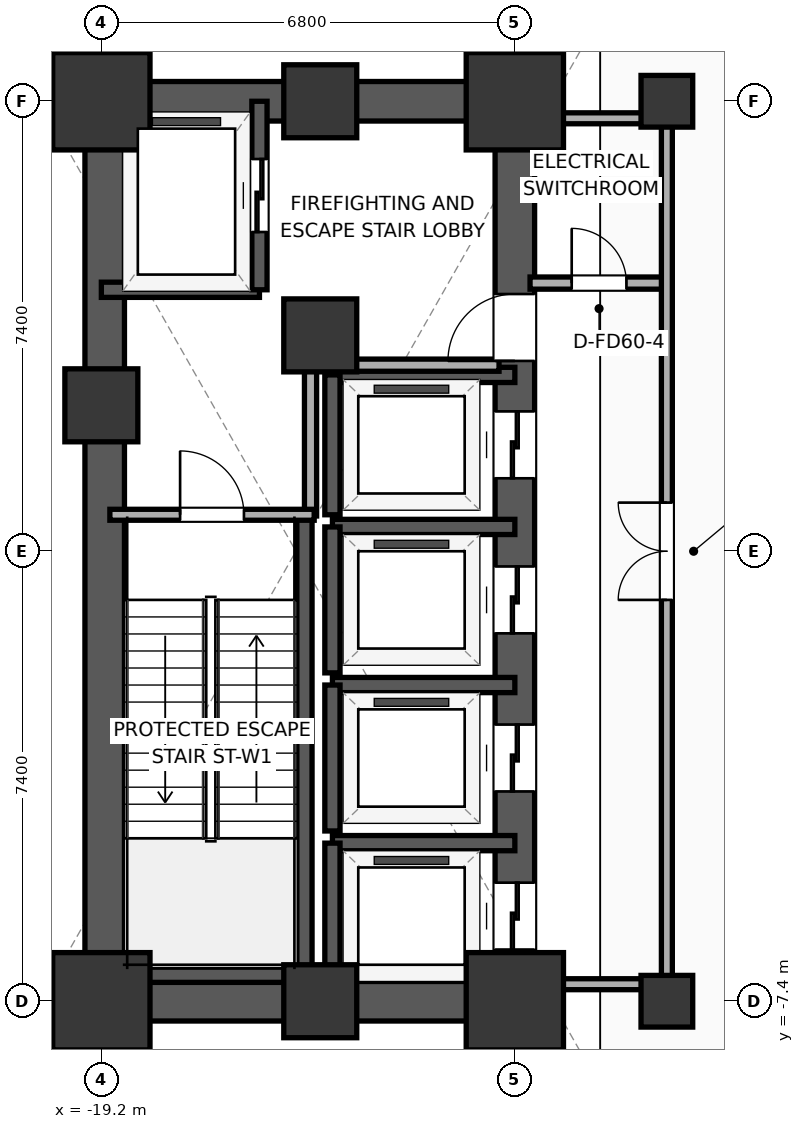
"""IFC4 building model, lengths in metres.
Left out: names, types, materials, properties, quantities, classifications, styles, units other than length and angle.
Written with IfcOpenShell. Run it as: python <this file> out.ifc"""

import sys

from ifc_helpers import new_model, si_unit, direction, frame, frame_2d, origin, origin_2d, place, context, subcontext, project, spatial, rectangle, extrude, element, fill, save


model = new_model("IFC4")
c1 = context("Model", 3, precision=1e-05, world=origin(), true_north=direction((0.0, 1.0)))
c2 = subcontext(c1, "Body", "Model", "MODEL_VIEW")
j1 = project(units=[si_unit("LENGTHUNIT", "METRE"), si_unit("PLANEANGLEUNIT", "RADIAN")], contexts=[c1])
p1 = place(None, origin())
s1 = spatial("IfcSite", under=j1, at=p1, CompositionType="ELEMENT")
p2 = place(p1, origin())
s2 = spatial("IfcBuilding", under=s1, at=p2, CompositionType="ELEMENT")
p3 = place(p2, frame((0.0, 0.0, -10.4)))
s3 = spatial("IfcBuildingStorey", under=s2, at=p3, CompositionType="ELEMENT", Elevation=-10.4)
p4 = place(p3, frame((-19.2, -7.4, 0.0), z_axis=(0.0, 0.0, 1.0), x_axis=(1.0, 0.0, 0.0)))
e1 = element("IfcColumn", 1, at=p4, inside=s3, PredefinedType="COLUMN", context=c2, shape_type="SweptSolid", body=[
    extrude(rectangle(XDim=1.6, YDim=1.6, at=origin_2d()), origin(), (0.0, 0.0, 1.0), 5.2),
])
p5 = place(p3, frame((-19.2, 2.4, 0.0), z_axis=(0.0, 0.0, 1.0), x_axis=(1.0, 0.0, 0.0)))
e2 = element("IfcColumn", 2, at=p5, inside=s3, PredefinedType="COLUMN", context=c2, shape_type="SweptSolid", body=[
    extrude(rectangle(XDim=1.2, YDim=1.2, at=origin_2d()), origin(), (0.0, 0.0, 1.0), 5.2),
])
p6 = place(p3, frame((-19.2, 7.4, 0.0), z_axis=(0.0, 0.0, 1.0), x_axis=(1.0, 0.0, 0.0)))
e3 = element("IfcColumn", 3, at=p6, inside=s3, PredefinedType="COLUMN", context=c2, shape_type="SweptSolid", body=[
    extrude(rectangle(XDim=1.6, YDim=1.6, at=origin_2d()), origin(), (0.0, 0.0, 1.0), 5.2),
])
for number, where, z_axis, x_axis in (
    (4, (-15.6, -7.4, 0.0), (0.0, 0.0, 1.0), (1.0, 0.0, 0.0)),
    (5, (-15.6, 7.4, 0.0), (0.0, 0.0, 1.0), (1.0, 0.0, 0.0)),
):
    element("IfcColumn", number, at=place(p3, frame(where, z_axis=z_axis, x_axis=x_axis)), inside=s3, PredefinedType="COLUMN", context=c2, shape_type="SweptSolid", body=[
        extrude(rectangle(XDim=1.2, YDim=1.2, at=origin_2d()), origin(), (0.0, 0.0, 1.0), 5.2),
    ])
p7 = place(p3, frame((-12.4, -7.4, 0.0), z_axis=(0.0, 0.0, 1.0), x_axis=(1.0, 0.0, 0.0)))
e6 = element("IfcColumn", 6, at=p7, inside=s3, PredefinedType="COLUMN", context=c2, shape_type="SweptSolid", body=[
    extrude(rectangle(XDim=1.6, YDim=1.6, at=origin_2d()), origin(), (0.0, 0.0, 1.0), 5.2),
])
p8 = place(p3, frame((-15.6, 3.55, 0.0), z_axis=(0.0, 0.0, 1.0), x_axis=(1.0, 0.0, 0.0)))
e7 = element("IfcColumn", 7, at=p8, inside=s3, PredefinedType="COLUMN", context=c2, shape_type="SweptSolid", body=[
    extrude(rectangle(XDim=1.2, YDim=1.2, at=origin_2d()), origin(), (0.0, 0.0, 1.0), 5.2),
])
p9 = place(p3, frame((-12.4, 7.4, 0.0), z_axis=(0.0, 0.0, 1.0), x_axis=(1.0, 0.0, 0.0)))
e8 = element("IfcColumn", 8, at=p9, inside=s3, PredefinedType="COLUMN", context=c2, shape_type="SweptSolid", body=[
    extrude(rectangle(XDim=1.6, YDim=1.6, at=origin_2d()), origin(), (0.0, 0.0, 1.0), 5.2),
])
for number, where, z_axis, x_axis in (
    (9, (-19.525, -7.4, 0.0), (0.0, 0.0, 1.0), (1.0, 0.0, 0.0)),
    (10, (-19.525, 7.4, 0.0), (0.0, 0.0, 1.0), (1.0, 0.0, 0.0)),
):
    element("IfcWall", number, at=place(p3, frame(where, z_axis=z_axis, x_axis=x_axis)), inside=s3, PredefinedType="SHEAR", context=c2, shape_type="SweptSolid", body=[
        extrude(rectangle(XDim=7.45, YDim=0.65, at=frame_2d((3.725, 0.0))), origin(), (0.0, 0.0, 1.0), 4.88),
    ])
p10 = place(p3, frame((-19.145, -7.4, 0.0), z_axis=(0.0, 0.0, 1.0), x_axis=(0.0, 1.0, 0.0)))
e11 = element("IfcWall", 11, at=p10, inside=s3, PredefinedType="SHEAR", context=c2, shape_type="SweptSolid", body=[
    extrude(rectangle(XDim=14.8, YDim=0.65, at=frame_2d((7.4, 0.0))), origin(), (0.0, 0.0, 1.0), 4.88),
])
p11 = place(p3, frame((-12.4, -7.4, 0.0), z_axis=(0.0, 0.0, 1.0), x_axis=(0.0, 1.0, 0.0)))
e12 = element("IfcWall", 12, at=p11, inside=s3, PredefinedType="SHEAR", context=c2, shape_type="SweptSolid", body=[
    extrude(rectangle(XDim=14.8, YDim=0.65, at=frame_2d((7.4, 0.0))), origin(), (0.0, 0.0, 1.0), 4.88),
])
p12 = place(p11, frame((0.85, 0.0, 0.0)))
e13 = element("IfcOpeningElement", 13, at=p12, cuts=e12, PredefinedType="OPENING", context=c2, shape_type="SweptSolid", body=[
    extrude(rectangle(XDim=1.1, YDim=2.05, at=frame_2d((0.55, 1.025))), frame((0.0, 0.335, 0.0), z_axis=(0.0, -1.0, 0.0), x_axis=(1.0, 0.0, 0.0)), (0.0, 0.0, 1.0), 0.67),
])
p13 = place(p11, frame((3.45, 0.0, 0.0)))
e14 = element("IfcOpeningElement", 14, at=p13, cuts=e12, PredefinedType="OPENING", context=c2, shape_type="SweptSolid", body=[
    extrude(rectangle(XDim=1.1, YDim=2.05, at=frame_2d((0.55, 1.025))), frame((0.0, 0.335, 0.0), z_axis=(0.0, -1.0, 0.0), x_axis=(1.0, 0.0, 0.0)), (0.0, 0.0, 1.0), 0.67),
])
p14 = place(p11, frame((6.05, 0.0, 0.0)))
e15 = element("IfcOpeningElement", 15, at=p14, cuts=e12, PredefinedType="OPENING", context=c2, shape_type="SweptSolid", body=[
    extrude(rectangle(XDim=1.1, YDim=2.05, at=frame_2d((0.55, 1.025))), frame((0.0, 0.335, 0.0), z_axis=(0.0, -1.0, 0.0), x_axis=(1.0, 0.0, 0.0)), (0.0, 0.0, 1.0), 0.67),
])
p15 = place(p11, frame((8.6, 0.0, 0.0)))
e16 = element("IfcOpeningElement", 16, at=p15, cuts=e12, PredefinedType="OPENING", context=c2, shape_type="SweptSolid", body=[
    extrude(rectangle(XDim=1.1, YDim=2.05, at=frame_2d((0.55, 1.025))), frame((0.0, 0.335, 0.0), z_axis=(0.0, -1.0, 0.0), x_axis=(1.0, 0.0, 0.0)), (0.0, 0.0, 1.0), 0.67),
])
p16 = place(p11, frame((10.53, 0.0, 0.0)))
e17 = element("IfcOpeningElement", 17, at=p16, cuts=e12, PredefinedType="OPENING", context=c2, shape_type="SweptSolid", body=[
    extrude(rectangle(XDim=1.1, YDim=2.05, at=frame_2d((0.55, 1.025))), frame((0.0, 0.335, 0.0), z_axis=(0.0, -1.0, 0.0), x_axis=(1.0, 0.0, 0.0)), (0.0, 0.0, 1.0), 0.67),
])
p17 = place(p3, frame((-15.86, -7.085, 0.0), z_axis=(0.0, 0.0, 1.0), x_axis=(0.0, 1.0, 0.0)))
e18 = element("IfcWall", 18, at=p17, inside=s3, PredefinedType="SOLIDWALL", context=c2, shape_type="SweptSolid", body=[
    extrude(rectangle(XDim=7.685, YDim=0.25, at=frame_2d((3.843, 0.0))), origin(), (0.0, 0.0, 1.0), 4.88),
])
p18 = place(p3, frame((-19.2, -6.965, 0.0), z_axis=(0.0, 0.0, 1.0), x_axis=(1.0, 0.0, 0.0)))
e19 = element("IfcWall", 19, at=p18, inside=s3, PredefinedType="SOLIDWALL", context=c2, shape_type="SweptSolid", body=[
    extrude(rectangle(XDim=3.46, YDim=0.25, at=frame_2d((1.73, 0.0))), origin(), (0.0, 0.0, 1.0), 4.88),
])
for number, where, z_axis, x_axis in (
    (20, (-9.9, -7.4, 0.0), (0.0, 0.0, 1.0), (1.0, 0.0, 0.0)),
    (21, (-9.9, 7.4, 0.0), (0.0, 0.0, 1.0), (1.0, 0.0, 0.0)),
):
    element("IfcColumn", number, at=place(p3, frame(where, z_axis=z_axis, x_axis=x_axis)), inside=s3, PredefinedType="COLUMN", context=c2, shape_type="SweptSolid", body=[
        extrude(rectangle(XDim=0.85, YDim=0.85, at=origin_2d()), origin(), (0.0, 0.0, 1.0), 5.2),
    ])
p19 = place(p3, frame((-19.2, 4.3, 0.0), z_axis=(0.0, 0.0, 1.0), x_axis=(1.0, 0.0, 0.0)))
e22 = element("IfcWall", 22, at=p19, inside=s3, PredefinedType="SOLIDWALL", context=c2, shape_type="SweptSolid", body=[
    extrude(rectangle(XDim=2.6, YDim=0.25, at=frame_2d((1.3, 0.0))), origin(), (0.0, 0.0, 1.0), 4.88),
])
p20 = place(p3, frame((-16.6, 4.3, 0.0), z_axis=(0.0, 0.0, 1.0), x_axis=(0.0, 1.0, 0.0)))
e23 = element("IfcWall", 23, at=p20, inside=s3, PredefinedType="SOLIDWALL", context=c2, shape_type="SweptSolid", body=[
    extrude(rectangle(XDim=3.1, YDim=0.25, at=frame_2d((1.55, 0.0))), origin(), (0.0, 0.0, 1.0), 4.88),
])
p21 = place(p20, frame((0.95, 0.0, 0.0)))
e24 = element("IfcOpeningElement", 24, at=p21, cuts=e23, PredefinedType="OPENING", context=c2, shape_type="SweptSolid", body=[
    extrude(rectangle(XDim=1.2, YDim=2.05, at=frame_2d((0.6, 1.025))), frame((0.0, 0.135, 0.0), z_axis=(0.0, -1.0, 0.0), x_axis=(1.0, 0.0, 0.0)), (0.0, 0.0, 1.0), 0.27),
])
p22 = place(p3, frame((-12.4, -4.8, 0.0), z_axis=(0.0, 0.0, 1.0), x_axis=(-1.0, 0.0, 0.0)))
e25 = element("IfcWall", 25, at=p22, inside=s3, PredefinedType="SOLIDWALL", context=c2, shape_type="SweptSolid", body=[
    extrude(rectangle(XDim=3.0, YDim=0.25, at=frame_2d((1.5, 0.0))), origin(), (0.0, 0.0, 1.0), 4.88),
])
p23 = place(p3, frame((-15.4, -4.8, 0.0), z_axis=(0.0, 0.0, 1.0), x_axis=(0.0, -1.0, 0.0)))
e26 = element("IfcWall", 26, at=p23, inside=s3, PredefinedType="SOLIDWALL", context=c2, shape_type="SweptSolid", body=[
    extrude(rectangle(XDim=2.6, YDim=0.25, at=frame_2d((1.3, 0.0))), origin(), (0.0, 0.0, 1.0), 4.88),
])
p24 = place(p3, frame((-12.4, -2.2, 0.0), z_axis=(0.0, 0.0, 1.0), x_axis=(-1.0, 0.0, 0.0)))
e27 = element("IfcWall", 27, at=p24, inside=s3, PredefinedType="SOLIDWALL", context=c2, shape_type="SweptSolid", body=[
    extrude(rectangle(XDim=3.0, YDim=0.25, at=frame_2d((1.5, 0.0))), origin(), (0.0, 0.0, 1.0), 4.88),
])
p25 = place(p3, frame((-15.4, -2.2, 0.0), z_axis=(0.0, 0.0, 1.0), x_axis=(0.0, -1.0, 0.0)))
e28 = element("IfcWall", 28, at=p25, inside=s3, PredefinedType="SOLIDWALL", context=c2, shape_type="SweptSolid", body=[
    extrude(rectangle(XDim=2.4, YDim=0.25, at=frame_2d((1.2, 0.0))), origin(), (0.0, 0.0, 1.0), 4.88),
])
p26 = place(p3, frame((-12.4, 0.4, 0.0), z_axis=(0.0, 0.0, 1.0), x_axis=(-1.0, 0.0, 0.0)))
e29 = element("IfcWall", 29, at=p26, inside=s3, PredefinedType="SOLIDWALL", context=c2, shape_type="SweptSolid", body=[
    extrude(rectangle(XDim=3.0, YDim=0.25, at=frame_2d((1.5, 0.0))), origin(), (0.0, 0.0, 1.0), 4.88),
])
p27 = place(p3, frame((-15.4, 0.4, 0.0), z_axis=(0.0, 0.0, 1.0), x_axis=(0.0, -1.0, 0.0)))
e30 = element("IfcWall", 30, at=p27, inside=s3, PredefinedType="SOLIDWALL", context=c2, shape_type="SweptSolid", body=[
    extrude(rectangle(XDim=2.4, YDim=0.25, at=frame_2d((1.2, 0.0))), origin(), (0.0, 0.0, 1.0), 4.88),
])
p28 = place(p3, frame((-12.4, 2.9, 0.0), z_axis=(0.0, 0.0, 1.0), x_axis=(-1.0, 0.0, 0.0)))
e31 = element("IfcWall", 31, at=p28, inside=s3, PredefinedType="SOLIDWALL", context=c2, shape_type="SweptSolid", body=[
    extrude(rectangle(XDim=3.0, YDim=0.25, at=frame_2d((1.5, 0.0))), origin(), (0.0, 0.0, 1.0), 4.88),
])
p29 = place(p3, frame((-15.4, 2.9, 0.0), z_axis=(0.0, 0.0, 1.0), x_axis=(0.0, -1.0, 0.0)))
e32 = element("IfcWall", 32, at=p29, inside=s3, PredefinedType="SOLIDWALL", context=c2, shape_type="SweptSolid", body=[
    extrude(rectangle(XDim=2.3, YDim=0.25, at=frame_2d((1.15, 0.0))), origin(), (0.0, 0.0, 1.0), 4.88),
])
p30 = place(p3, frame((-15.76, 0.58, 0.0), z_axis=(0.0, 0.0, 1.0), x_axis=(0.0, 1.0, 0.0)))
e33 = element("IfcWall", 33, at=p30, inside=s3, PredefinedType="PARTITIONING", context=c2, shape_type="SweptSolid", body=[
    extrude(rectangle(XDim=2.52, YDim=0.2, at=frame_2d((1.26, 0.0))), origin(), (0.0, 0.0, 1.0), 4.88),
])
p31 = place(p3, frame((-15.82, 3.06, 0.0), z_axis=(0.0, 0.0, 1.0), x_axis=(1.0, 0.0, 0.0)))
e34 = element("IfcWall", 34, at=p31, inside=s3, PredefinedType="PARTITIONING", context=c2, shape_type="SweptSolid", body=[
    extrude(rectangle(XDim=3.16, YDim=0.2, at=frame_2d((1.58, 0.0))), origin(), (0.0, 0.0, 1.0), 4.88),
])
p32 = place(p3, frame((-19.06, 0.6, 0.0), z_axis=(0.0, 0.0, 1.0), x_axis=(1.0, 0.0, 0.0)))
e35 = element("IfcWall", 35, at=p32, inside=s3, PredefinedType="PARTITIONING", context=c2, shape_type="SweptSolid", body=[
    extrude(rectangle(XDim=3.36, YDim=0.18, at=frame_2d((1.68, 0.0))), origin(), (0.0, 0.0, 1.0), 4.88),
])
p33 = place(p32, frame((1.155, 0.0, 0.0)))
e36 = element("IfcOpeningElement", 36, at=p33, cuts=e35, PredefinedType="OPENING", context=c2, shape_type="SweptSolid", body=[
    extrude(rectangle(XDim=1.05, YDim=2.05, at=frame_2d((0.525, 1.025))), frame((0.0, 0.1, 0.0), z_axis=(0.0, -1.0, 0.0), x_axis=(1.0, 0.0, 0.0)), (0.0, 0.0, 1.0), 0.2),
])
p34 = place(p3, frame((-12.15, 4.41, 0.0), z_axis=(0.0, 0.0, 1.0), x_axis=(1.0, 0.0, 0.0)))
e37 = element("IfcWall", 37, at=p34, inside=s3, PredefinedType="PARTITIONING", context=c2, shape_type="SweptSolid", body=[
    extrude(rectangle(XDim=2.27, YDim=0.2, at=frame_2d((1.135, 0.0))), origin(), (0.0, 0.0, 1.0), 4.88),
])
p35 = place(p34, frame((0.685, 0.0, 0.0)))
e38 = element("IfcOpeningElement", 38, at=p35, cuts=e37, PredefinedType="OPENING", context=c2, shape_type="SweptSolid", body=[
    extrude(rectangle(XDim=0.9, YDim=2.05, at=frame_2d((0.45, 1.025))), frame((0.0, 0.11, 0.0), z_axis=(0.0, -1.0, 0.0), x_axis=(1.0, 0.0, 0.0)), (0.0, 0.0, 1.0), 0.22),
])
for number, where, z_axis, x_axis in (
    (39, (-12.15, 7.12, 0.0), (0.0, 0.0, 1.0), (1.0, 0.0, 0.0)),
    (40, (-12.15, -7.12, 0.0), (0.0, 0.0, 1.0), (1.0, 0.0, 0.0)),
):
    element("IfcWall", number, at=place(p3, frame(where, z_axis=z_axis, x_axis=x_axis)), inside=s3, PredefinedType="PARTITIONING", context=c2, shape_type="SweptSolid", body=[
        extrude(rectangle(XDim=2.27, YDim=0.18, at=frame_2d((1.135, 0.0))), origin(), (0.0, 0.0, 1.0), 4.07),
    ])
p36 = place(p3, frame((-9.9, -7.12, 0.0), z_axis=(0.0, 0.0, 1.0), x_axis=(0.0, 1.0, 0.0)))
e41 = element("IfcWall", 41, at=p36, inside=s3, PredefinedType="PARTITIONING", context=c2, shape_type="SweptSolid", body=[
    extrude(rectangle(XDim=14.24, YDim=0.18, at=frame_2d((7.12, 0.0))), origin(), (0.0, 0.0, 1.0), 4.07),
])
p37 = place(p36, frame((6.32, 0.0, 0.0)))
e42 = element("IfcOpeningElement", 42, at=p37, cuts=e41, PredefinedType="OPENING", context=c2, shape_type="SweptSolid", body=[
    extrude(rectangle(XDim=1.6, YDim=2.05, at=frame_2d((0.8, 1.025))), frame((0.0, 0.1, 0.0), z_axis=(0.0, -1.0, 0.0), x_axis=(1.0, 0.0, 0.0)), (0.0, 0.0, 1.0), 0.2),
])
p38 = place(p21, origin())
e43 = element("IfcDoor", 43, at=p38, inside=s3, OperationType="SLIDING_TO_LEFT", PredefinedType="DOOR", context=c2, shape_type="SweptSolid", body=[
    extrude(rectangle(XDim=1.2, YDim=2.05, at=frame_2d((0.6, 1.025))), frame((0.0, 0.025, 0.0), z_axis=(0.0, -1.0, 0.0), x_axis=(1.0, 0.0, 0.0)), (0.0, 0.0, 1.0), 0.05),
])
fill(e24, e43)
p39 = place(p12, origin())
e44 = element("IfcDoor", 44, at=p39, inside=s3, OperationType="SLIDING_TO_LEFT", PredefinedType="DOOR", context=c2, shape_type="SweptSolid", body=[
    extrude(rectangle(XDim=1.1, YDim=2.05, at=frame_2d((0.55, 1.025))), frame((0.0, 0.025, 0.0), z_axis=(0.0, -1.0, 0.0), x_axis=(1.0, 0.0, 0.0)), (0.0, 0.0, 1.0), 0.05),
])
fill(e13, e44)
p40 = place(p13, origin())
e45 = element("IfcDoor", 45, at=p40, inside=s3, OperationType="SLIDING_TO_LEFT", PredefinedType="DOOR", context=c2, shape_type="SweptSolid", body=[
    extrude(rectangle(XDim=1.1, YDim=2.05, at=frame_2d((0.55, 1.025))), frame((0.0, 0.025, 0.0), z_axis=(0.0, -1.0, 0.0), x_axis=(1.0, 0.0, 0.0)), (0.0, 0.0, 1.0), 0.05),
])
fill(e14, e45)
p41 = place(p14, origin())
e46 = element("IfcDoor", 46, at=p41, inside=s3, OperationType="SLIDING_TO_LEFT", PredefinedType="DOOR", context=c2, shape_type="SweptSolid", body=[
    extrude(rectangle(XDim=1.1, YDim=2.05, at=frame_2d((0.55, 1.025))), frame((0.0, 0.025, 0.0), z_axis=(0.0, -1.0, 0.0), x_axis=(1.0, 0.0, 0.0)), (0.0, 0.0, 1.0), 0.05),
])
fill(e15, e46)
p42 = place(p15, origin())
e47 = element("IfcDoor", 47, at=p42, inside=s3, OperationType="SLIDING_TO_LEFT", PredefinedType="DOOR", context=c2, shape_type="SweptSolid", body=[
    extrude(rectangle(XDim=1.1, YDim=2.05, at=frame_2d((0.55, 1.025))), frame((0.0, 0.025, 0.0), z_axis=(0.0, -1.0, 0.0), x_axis=(1.0, 0.0, 0.0)), (0.0, 0.0, 1.0), 0.05),
])
fill(e16, e47)
p43 = place(p33, origin())
e48 = element("IfcDoor", 48, at=p43, inside=s3, OperationType="SINGLE_SWING_LEFT", PredefinedType="DOOR", context=c2, shape_type="SweptSolid", body=[
    extrude(rectangle(XDim=1.05, YDim=2.05, at=frame_2d((0.525, 1.025))), frame((0.0, 0.025, 0.0), z_axis=(0.0, -1.0, 0.0), x_axis=(1.0, 0.0, 0.0)), (0.0, 0.0, 1.0), 0.05),
])
fill(e36, e48)
p44 = place(p35, origin())
e49 = element("IfcDoor", 49, at=p44, inside=s3, OperationType="SINGLE_SWING_LEFT", PredefinedType="DOOR", context=c2, shape_type="SweptSolid", body=[
    extrude(rectangle(XDim=0.9, YDim=2.05, at=frame_2d((0.45, 1.025))), frame((0.0, 0.025, 0.0), z_axis=(0.0, -1.0, 0.0), x_axis=(1.0, 0.0, 0.0)), (0.0, 0.0, 1.0), 0.05),
])
fill(e38, e49)
p45 = place(p37, origin())
e50 = element("IfcDoor", 50, at=p45, inside=s3, OperationType="DOUBLE_DOOR_SINGLE_SWING", PredefinedType="DOOR", context=c2, shape_type="SweptSolid", body=[
    extrude(rectangle(XDim=1.6, YDim=2.05, at=frame_2d((0.8, 1.025))), frame((0.0, 0.025, 0.0), z_axis=(0.0, -1.0, 0.0), x_axis=(1.0, 0.0, 0.0)), (0.0, 0.0, 1.0), 0.05),
])
fill(e42, e50)
p46 = place(p16, origin())
e51 = element("IfcDoor", 51, at=p46, inside=s3, OperationType="SINGLE_SWING_LEFT", PredefinedType="DOOR", context=c2, shape_type="SweptSolid", body=[
    extrude(rectangle(XDim=1.1, YDim=2.05, at=frame_2d((0.55, 1.025))), frame((0.0, 0.025, 0.0), z_axis=(0.0, -1.0, 0.0), x_axis=(1.0, 0.0, 0.0)), (0.0, 0.0, 1.0), 0.05),
])
fill(e17, e51)
save(model, sys.argv[1])
